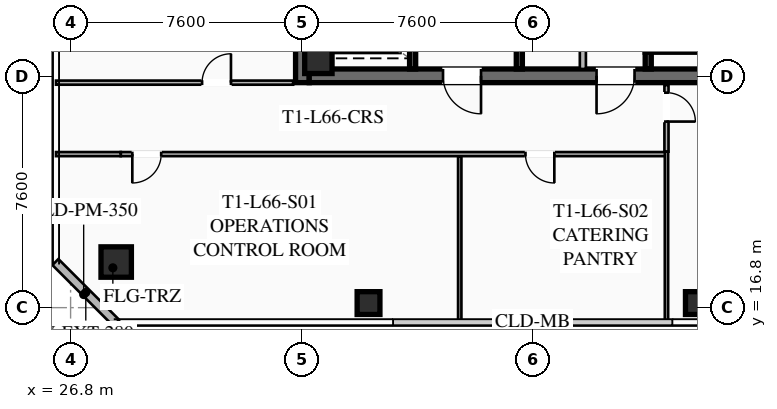
"""IFC4 building model, lengths in metres.
Left out: names, types, materials, properties, quantities, classifications, styles, units other than length and angle.
Written with IfcOpenShell. Run it as: python <this file> out.ifc"""

import sys

from ifc_helpers import new_model, si_unit, direction, frame, frame_2d, origin, origin_2d, place, context, subcontext, project, spatial, rectangle, hollow_rectangle, extrude, element, fill, save


model = new_model("IFC4")
c1 = context("Model", 3, precision=1e-05, world=origin(), true_north=direction((0.0, 1.0)))
c2 = subcontext(c1, "Body", "Model", "MODEL_VIEW")
j1 = project(units=[si_unit("LENGTHUNIT", "METRE"), si_unit("PLANEANGLEUNIT", "RADIAN")], contexts=[c1])
p1 = place(None, origin())
s1 = spatial("IfcSite", under=j1, at=p1, CompositionType="ELEMENT")
p2 = place(p1, origin())
s2 = spatial("IfcBuilding", under=s1, at=p2, CompositionType="ELEMENT")
p3 = place(p2, frame((0.0, 0.0, 243.25)))
s3 = spatial("IfcBuildingStorey", under=s2, at=p3, CompositionType="ELEMENT", Elevation=243.25)
p4 = place(p3, frame((34.425, 24.2, 0.0), z_axis=(0.0, 0.0, 1.0), x_axis=(0.0, 1.0, 0.0)))
e1 = element("IfcWall", 1, at=p4, inside=s3, PredefinedType="SHEAR", context=c2, shape_type="SweptSolid", body=[
    extrude(rectangle(XDim=15.6, YDim=0.45, at=frame_2d((7.8, 0.0))), origin(), (0.0, 0.0, 1.0), 3.55),
])
p5 = place(p3, frame((49.35, 24.425, 0.0), z_axis=(0.0, 0.0, 1.0), x_axis=(-1.0, 0.0, 0.0)))
e2 = element("IfcWall", 2, at=p5, inside=s3, PredefinedType="SHEAR", context=c2, shape_type="SweptSolid", body=[
    extrude(rectangle(XDim=14.7, YDim=0.45, at=frame_2d((7.35, 0.0))), origin(), (0.0, 0.0, 1.0), 3.55),
])
p6 = place(p5, frame((9.05, 0.0, 0.0)))
e3 = element("IfcOpeningElement", 3, at=p6, cuts=e2, PredefinedType="OPENING", context=c2, shape_type="SweptSolid", body=[
    extrude(rectangle(XDim=1.25, YDim=2.25, at=frame_2d((0.625, 1.125))), frame((0.0, 0.235, 0.0), z_axis=(0.0, -1.0, 0.0), x_axis=(1.0, 0.0, 0.0)), (0.0, 0.0, 1.0), 0.47),
])
p7 = place(p5, frame((4.0, 0.0, 0.0)))
e4 = element("IfcOpeningElement", 4, at=p7, cuts=e2, PredefinedType="OPENING", context=c2, shape_type="SweptSolid", body=[
    extrude(rectangle(XDim=1.25, YDim=2.25, at=frame_2d((0.625, 1.125))), frame((0.0, 0.235, 0.0), z_axis=(0.0, -1.0, 0.0), x_axis=(1.0, 0.0, 0.0)), (0.0, 0.0, 1.0), 0.47),
])
p8 = place(p3, frame((34.95, 24.95, 0.0), z_axis=(0.0, 0.0, 1.0), x_axis=(1.0, 0.0, 0.0)))
e5 = element("IfcColumn", 5, at=p8, inside=s3, PredefinedType="COLUMN", context=c2, shape_type="SweptSolid", body=[
    extrude(hollow_rectangle(XDim=0.9, YDim=0.9, WallThickness=0.04, at=origin_2d()), origin(), (0.0, 0.0, 1.0), 3.25),
])
p9 = place(p3, frame((28.3, 18.3, 0.0), z_axis=(0.0, 0.0, 1.0), x_axis=(1.0, 0.0, 0.0)))
e6 = element("IfcColumn", 6, at=p9, inside=s3, PredefinedType="COLUMN", context=c2, shape_type="SweptSolid", body=[
    extrude(hollow_rectangle(XDim=1.0, YDim=1.0, WallThickness=0.04, at=origin_2d()), origin(), (0.0, 0.0, 1.0), 3.25),
])
for number, where, z_axis, x_axis in (
    (7, (36.6, 16.95, 0.0), (0.0, 0.0, 1.0), (1.0, 0.0, 0.0)),
    (8, (47.4, 16.95, 0.0), (0.0, 0.0, 1.0), (1.0, 0.0, 0.0)),
):
    element("IfcColumn", number, at=place(p3, frame(where, z_axis=z_axis, x_axis=x_axis)), inside=s3, PredefinedType="COLUMN", context=c2, shape_type="SweptSolid", body=[
        extrude(hollow_rectangle(XDim=0.75, YDim=0.75, WallThickness=0.032, at=origin_2d()), origin(), (0.0, 0.0, 1.0), 3.25),
    ])
p10 = place(p3, frame((28.3, 16.3, 0.0), z_axis=(0.0, 0.0, 1.0), x_axis=(-0.707106781187, 0.707106781187, 0.0)))
e9 = element("IfcWall", 9, at=p10, inside=s3, PredefinedType="SOLIDWALL", context=c2, shape_type="SweptSolid", body=[
    extrude(rectangle(XDim=2.828, YDim=0.28, at=frame_2d((1.414, 0.0))), origin(), (0.0, 0.0, 1.0), 3.25),
])
p11 = place(p3, frame((45.8, 32.8, 0.0), z_axis=(0.0, 0.0, 1.0), x_axis=(0.0, -1.0, 0.0)))
e10 = element("IfcWall", 10, at=p11, inside=s3, PredefinedType="SHEAR", context=c2, shape_type="SweptSolid", body=[
    extrude(rectangle(XDim=8.15, YDim=0.2, at=frame_2d((4.075, 0.0))), origin(), (0.0, 0.0, 1.0), 3.25),
])
p12 = place(p11, frame((0.45, 0.0, 0.0)))
e11 = element("IfcOpeningElement", 11, at=p12, cuts=e10, PredefinedType="OPENING", context=c2, shape_type="SweptSolid", body=[
    extrude(rectangle(XDim=1.15, YDim=2.2, at=frame_2d((0.575, 1.1))), frame((0.0, 0.11, 0.0), z_axis=(0.0, -1.0, 0.0), x_axis=(1.0, 0.0, 0.0)), (0.0, 0.0, 1.0), 0.22),
])
p13 = place(p3, frame((41.56, 24.65, 0.0), z_axis=(0.0, 0.0, 1.0), x_axis=(0.0, 1.0, 0.0)))
e12 = element("IfcWall", 12, at=p13, inside=s3, PredefinedType="SHEAR", context=c2, shape_type="SweptSolid", body=[
    extrude(rectangle(XDim=14.7, YDim=0.2, at=frame_2d((7.35, 0.0))), origin(), (0.0, 0.0, 1.0), 3.25),
])
p14 = place(p3, frame((38.05, 24.65, 0.0), z_axis=(0.0, 0.0, 1.0), x_axis=(0.0, 1.0, 0.0)))
e13 = element("IfcWall", 13, at=p14, inside=s3, PredefinedType="SHEAR", context=c2, shape_type="SweptSolid", body=[
    extrude(rectangle(XDim=6.55, YDim=0.2, at=frame_2d((3.275, 0.0))), origin(), (0.0, 0.0, 1.0), 3.25),
])
p15 = place(p14, frame((4.975, 0.0, 0.0)))
e14 = element("IfcOpeningElement", 14, at=p15, cuts=e13, PredefinedType="OPENING", context=c2, shape_type="SweptSolid", body=[
    extrude(rectangle(XDim=1.3, YDim=2.25, at=frame_2d((0.65, 1.125))), frame((0.0, 0.11, 0.0), z_axis=(0.0, -1.0, 0.0), x_axis=(1.0, 0.0, 0.0)), (0.0, 0.0, 1.0), 0.22),
])
p16 = place(p14, frame((2.975, 0.0, 0.0)))
e15 = element("IfcOpeningElement", 15, at=p16, cuts=e13, PredefinedType="OPENING", context=c2, shape_type="SweptSolid", body=[
    extrude(rectangle(XDim=1.3, YDim=2.25, at=frame_2d((0.65, 1.125))), frame((0.0, 0.11, 0.0), z_axis=(0.0, -1.0, 0.0), x_axis=(1.0, 0.0, 0.0)), (0.0, 0.0, 1.0), 0.22),
])
p17 = place(p14, frame((0.775, 0.0, 0.0)))
e16 = element("IfcOpeningElement", 16, at=p17, cuts=e13, PredefinedType="OPENING", context=c2, shape_type="SweptSolid", body=[
    extrude(rectangle(XDim=1.3, YDim=2.25, at=frame_2d((0.65, 1.125))), frame((0.0, 0.11, 0.0), z_axis=(0.0, -1.0, 0.0), x_axis=(1.0, 0.0, 0.0)), (0.0, 0.0, 1.0), 0.22),
])
p18 = place(p3, frame((43.65, 24.65, 0.0), z_axis=(0.0, 0.0, 1.0), x_axis=(0.0, 1.0, 0.0)))
e17 = element("IfcWall", 17, at=p18, inside=s3, PredefinedType="SOLIDWALL", context=c2, shape_type="SweptSolid", body=[
    extrude(rectangle(XDim=7.0, YDim=0.2, at=frame_2d((3.5, 0.0))), origin(), (0.0, 0.0, 1.0), 2.393),
])
p19 = place(p18, frame((0.85, 0.0, 0.0)))
e18 = element("IfcOpeningElement", 18, at=p19, cuts=e17, PredefinedType="OPENING", context=c2, shape_type="SweptSolid", body=[
    extrude(rectangle(XDim=0.95, YDim=2.05, at=frame_2d((0.475, 1.025))), frame((0.0, 0.11, 0.0), z_axis=(0.0, -1.0, 0.0), x_axis=(1.0, 0.0, 0.0)), (0.0, 0.0, 1.0), 0.22),
])
p20 = place(p18, frame((4.8, 0.0, 0.0)))
e19 = element("IfcOpeningElement", 19, at=p20, cuts=e17, PredefinedType="OPENING", context=c2, shape_type="SweptSolid", body=[
    extrude(rectangle(XDim=1.05, YDim=2.2, at=frame_2d((0.525, 1.1))), frame((0.0, 0.11, 0.0), z_axis=(0.0, -1.0, 0.0), x_axis=(1.0, 0.0, 0.0)), (0.0, 0.0, 1.0), 0.22),
])
p21 = place(p3, frame((46.4, 21.85, 0.0), z_axis=(0.0, 0.0, 1.0), x_axis=(-1.0, 0.0, 0.0)))
e20 = element("IfcWall", 20, at=p21, inside=s3, PredefinedType="PARTITIONING", context=c2, shape_type="SweptSolid", body=[
    extrude(rectangle(XDim=17.95, YDim=0.135, at=frame_2d((8.975, 0.0))), origin(), (0.0, 0.0, 1.0), 2.393),
])
p22 = place(p21, frame((16.62, 0.0, 0.0)))
e21 = element("IfcOpeningElement", 21, at=p22, cuts=e20, PredefinedType="OPENING", context=c2, shape_type="SweptSolid", body=[
    extrude(rectangle(XDim=0.95, YDim=2.05, at=frame_2d((0.475, 1.025))), frame((0.0, 0.077, 0.0), z_axis=(0.0, -1.0, 0.0), x_axis=(1.0, 0.0, 0.0)), (0.0, 0.0, 1.0), 0.155),
])
p23 = place(p21, frame((3.688, 0.0, 0.0)))
e22 = element("IfcOpeningElement", 22, at=p23, cuts=e20, PredefinedType="OPENING", context=c2, shape_type="SweptSolid", body=[
    extrude(rectangle(XDim=0.95, YDim=2.05, at=frame_2d((0.475, 1.025))), frame((0.0, 0.077, 0.0), z_axis=(0.0, -1.0, 0.0), x_axis=(1.0, 0.0, 0.0)), (0.0, 0.0, 1.0), 0.155),
])
p24 = place(p3, frame((26.32, 21.85, 0.0), z_axis=(0.0, 0.0, 1.0), x_axis=(1.0, 0.0, 0.0)))
e23 = element("IfcWall", 23, at=p24, inside=s3, PredefinedType="PARTITIONING", context=c2, shape_type="SweptSolid", body=[
    extrude(rectangle(XDim=2.13, YDim=0.135, at=frame_2d((1.065, 0.0))), origin(), (0.0, 0.0, 1.0), 2.393),
])
p25 = place(p3, frame((46.4, 24.12, 0.0), z_axis=(0.0, 0.0, 1.0), x_axis=(0.0, -1.0, 0.0)))
e24 = element("IfcWall", 24, at=p25, inside=s3, PredefinedType="PARTITIONING", context=c2, shape_type="SweptSolid", body=[
    extrude(rectangle(XDim=2.19, YDim=0.135, at=frame_2d((1.095, 0.0))), origin(), (0.0, 0.0, 1.0), 2.393),
])
p26 = place(p25, frame((0.25, 0.0, 0.0)))
e25 = element("IfcOpeningElement", 25, at=p26, cuts=e24, PredefinedType="OPENING", context=c2, shape_type="SweptSolid", body=[
    extrude(rectangle(XDim=0.95, YDim=2.05, at=frame_2d((0.475, 1.025))), frame((0.0, 0.077, 0.0), z_axis=(0.0, -1.0, 0.0), x_axis=(1.0, 0.0, 0.0)), (0.0, 0.0, 1.0), 0.155),
])
p27 = place(p3, frame((39.6, 16.32, 0.0), z_axis=(0.0, 0.0, 1.0), x_axis=(0.0, 1.0, 0.0)))
e26 = element("IfcWall", 26, at=p27, inside=s3, PredefinedType="PARTITIONING", context=c2, shape_type="SweptSolid", body=[
    extrude(rectangle(XDim=5.45, YDim=0.11, at=frame_2d((2.725, 0.0))), origin(), (0.0, 0.0, 1.0), 2.393),
])
p28 = place(p3, frame((46.4, 16.32, 0.0), z_axis=(0.0, 0.0, 1.0), x_axis=(0.0, 1.0, 0.0)))
e27 = element("IfcWall", 27, at=p28, inside=s3, PredefinedType="PARTITIONING", context=c2, shape_type="SweptSolid", body=[
    extrude(rectangle(XDim=5.61, YDim=0.11, at=frame_2d((2.805, 0.0))), origin(), (0.0, 0.0, 1.0), 2.393),
])
p29 = place(p3, frame((26.32, 24.2, 0.0), z_axis=(0.0, 0.0, 1.0), x_axis=(1.0, 0.0, 0.0)))
e28 = element("IfcWall", 28, at=p29, inside=s3, PredefinedType="PARTITIONING", context=c2, shape_type="SweptSolid", body=[
    extrude(rectangle(XDim=7.8, YDim=0.135, at=frame_2d((3.9, 0.0))), origin(), (0.0, 0.0, 1.0), 2.393),
])
p30 = place(p29, frame((4.805, 0.0, 0.0)))
e29 = element("IfcOpeningElement", 29, at=p30, cuts=e28, PredefinedType="OPENING", context=c2, shape_type="SweptSolid", body=[
    extrude(rectangle(XDim=0.95, YDim=2.05, at=frame_2d((0.475, 1.025))), frame((0.0, 0.077, 0.0), z_axis=(0.0, -1.0, 0.0), x_axis=(1.0, 0.0, 0.0)), (0.0, 0.0, 1.0), 0.155),
])
p31 = place(p6, origin())
e30 = element("IfcDoor", 30, at=p31, inside=s3, OperationType="SINGLE_SWING_LEFT", PredefinedType="DOOR", context=c2, shape_type="SweptSolid", body=[
    extrude(rectangle(XDim=1.25, YDim=2.25, at=frame_2d((0.625, 1.125))), frame((0.0, 0.025, 0.0), z_axis=(0.0, -1.0, 0.0), x_axis=(1.0, 0.0, 0.0)), (0.0, 0.0, 1.0), 0.05),
])
fill(e3, e30)
p32 = place(p7, origin())
e31 = element("IfcDoor", 31, at=p32, inside=s3, OperationType="SINGLE_SWING_RIGHT", PredefinedType="DOOR", context=c2, shape_type="SweptSolid", body=[
    extrude(rectangle(XDim=1.25, YDim=2.25, at=frame_2d((0.625, 1.125))), frame((0.0, 0.025, 0.0), z_axis=(0.0, -1.0, 0.0), x_axis=(1.0, 0.0, 0.0)), (0.0, 0.0, 1.0), 0.05),
])
fill(e4, e31)
p33 = place(p22, origin())
e32 = element("IfcDoor", 32, at=p33, inside=s3, OperationType="SINGLE_SWING_RIGHT", PredefinedType="DOOR", context=c2, shape_type="SweptSolid", body=[
    extrude(rectangle(XDim=0.95, YDim=2.05, at=frame_2d((0.475, 1.025))), frame((0.0, 0.025, 0.0), z_axis=(0.0, -1.0, 0.0), x_axis=(1.0, 0.0, 0.0)), (0.0, 0.0, 1.0), 0.05),
])
fill(e21, e32)
p34 = place(p23, origin())
e33 = element("IfcDoor", 33, at=p34, inside=s3, OperationType="SINGLE_SWING_LEFT", PredefinedType="DOOR", context=c2, shape_type="SweptSolid", body=[
    extrude(rectangle(XDim=0.95, YDim=2.05, at=frame_2d((0.475, 1.025))), frame((0.0, 0.025, 0.0), z_axis=(0.0, -1.0, 0.0), x_axis=(1.0, 0.0, 0.0)), (0.0, 0.0, 1.0), 0.05),
])
fill(e22, e33)
p35 = place(p26, origin())
e34 = element("IfcDoor", 34, at=p35, inside=s3, OperationType="SINGLE_SWING_RIGHT", PredefinedType="DOOR", context=c2, shape_type="SweptSolid", body=[
    extrude(rectangle(XDim=0.95, YDim=2.05, at=frame_2d((0.475, 1.025))), frame((0.0, 0.025, 0.0), z_axis=(0.0, -1.0, 0.0), x_axis=(1.0, 0.0, 0.0)), (0.0, 0.0, 1.0), 0.05),
])
fill(e25, e34)
p36 = place(p30, origin())
e35 = element("IfcDoor", 35, at=p36, inside=s3, OperationType="SINGLE_SWING_RIGHT", PredefinedType="DOOR", context=c2, shape_type="SweptSolid", body=[
    extrude(rectangle(XDim=0.95, YDim=2.05, at=frame_2d((0.475, 1.025))), frame((0.0, 0.025, 0.0), z_axis=(0.0, -1.0, 0.0), x_axis=(1.0, 0.0, 0.0)), (0.0, 0.0, 1.0), 0.05),
])
fill(e29, e35)
save(model, sys.argv[1])
